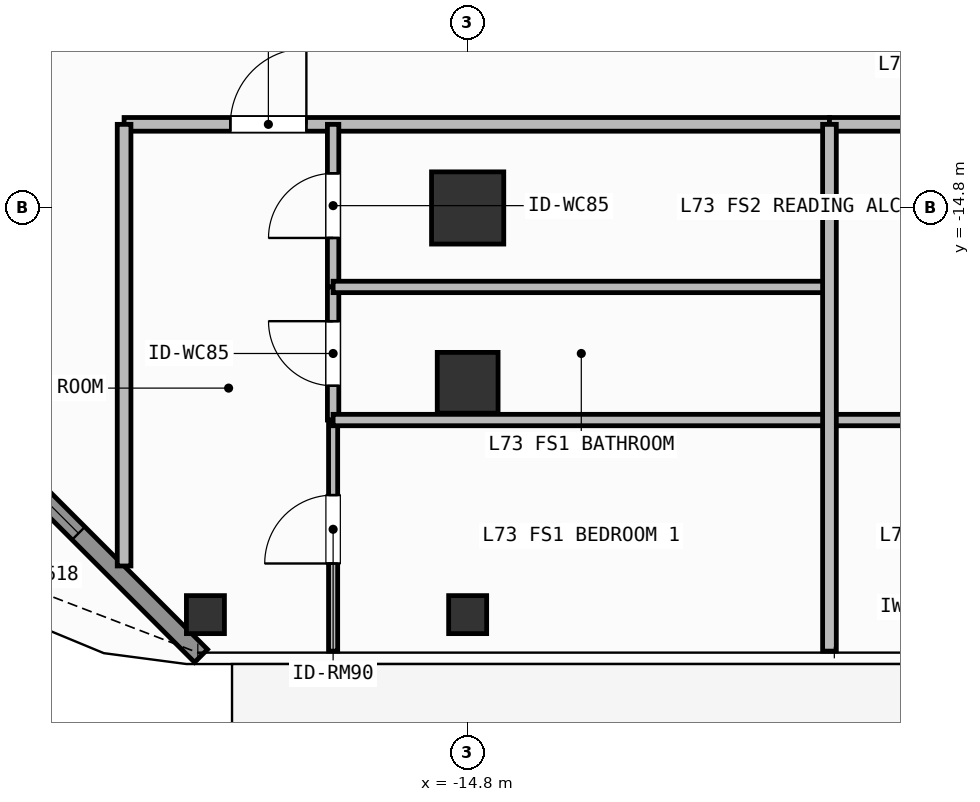
"""IFC4 building model, lengths in metres.
Left out: names, types, materials, properties, quantities, classifications, styles, units other than length and angle.
Written with IfcOpenShell. Run it as: python <this file> out.ifc"""

import sys

from ifc_helpers import new_model, si_unit, direction, frame, frame_2d, origin, origin_2d, place, context, subcontext, project, spatial, rectangle, hollow_rectangle, extrude, element, fill, save


model = new_model("IFC4")
c1 = context("Model", 3, precision=1e-05, world=origin(), true_north=direction((0.0, 1.0)))
c2 = subcontext(c1, "Body", "Model", "MODEL_VIEW")
j1 = project(units=[si_unit("LENGTHUNIT", "METRE"), si_unit("PLANEANGLEUNIT", "RADIAN")], contexts=[c1])
p1 = place(None, origin())
s1 = spatial("IfcSite", under=j1, at=p1, CompositionType="ELEMENT")
p2 = place(p1, origin())
s2 = spatial("IfcBuilding", under=s1, at=p2, CompositionType="ELEMENT")
p3 = place(p2, frame((0.0, 0.0, 297.6)))
s3 = spatial("IfcBuildingStorey", under=s2, at=p3, CompositionType="ELEMENT", Elevation=297.6)
p4 = place(p3, frame((-14.8, -14.8, 0.0), z_axis=(0.0, 0.0, 1.0), x_axis=(1.0, 0.0, 0.0)))
e1 = element("IfcColumn", 1, at=p4, inside=s3, PredefinedType="COLUMN", context=c2, shape_type="SweptSolid", body=[
    extrude(rectangle(XDim=0.95, YDim=0.95, at=origin_2d()), origin(), (0.0, 0.0, 1.0), 3.9),
])
p5 = place(p3, frame((-14.8, -17.1, 0.0), z_axis=(0.0, 0.0, 1.0), x_axis=(1.0, 0.0, 0.0)))
e2 = element("IfcColumn", 2, at=p5, inside=s3, PredefinedType="COLUMN", context=c2, shape_type="SweptSolid", body=[
    extrude(hollow_rectangle(XDim=0.8, YDim=0.8, WallThickness=0.036, at=origin_2d()), origin(), (0.0, 0.0, 1.0), 3.9),
])
for number, where, z_axis, x_axis in (
    (3, (-18.25, -20.15, 0.0), (0.0, 0.0, 1.0), (1.0, 0.0, 0.0)),
    (4, (-14.8, -20.15, 0.0), (0.0, 0.0, 1.0), (1.0, 0.0, 0.0)),
):
    element("IfcColumn", number, at=place(p3, frame(where, z_axis=z_axis, x_axis=x_axis)), inside=s3, PredefinedType="COLUMN", context=c2, shape_type="SweptSolid", body=[
        extrude(hollow_rectangle(XDim=0.5, YDim=0.5, WallThickness=0.025, at=origin_2d()), origin(), (0.0, 0.0, 1.0), 3.9),
    ])
p6 = place(p3, frame((-18.308, -20.692, 0.0), z_axis=(0.0, 0.0, 1.0), x_axis=(-0.707106781187, 0.707106781187, 0.0)))
e5 = element("IfcWall", 5, at=p6, inside=s3, PredefinedType="SOLIDWALL", context=c2, shape_type="SweptSolid", body=[
    extrude(rectangle(XDim=6.059, YDim=0.24, at=frame_2d((3.03, 0.0))), origin(), (0.0, 0.0, 1.0), 3.68),
])
p7 = place(p6, frame((2.28, 0.0, 0.8)))
e6 = element("IfcOpeningElement", 6, at=p7, cuts=e5, PredefinedType="OPENING", context=c2, shape_type="SweptSolid", body=[
    extrude(rectangle(XDim=1.5, YDim=1.85, at=frame_2d((0.75, 0.925))), frame((0.0, 0.13, 0.0), z_axis=(0.0, -1.0, 0.0), x_axis=(1.0, 0.0, 0.0)), (0.0, 0.0, 1.0), 0.26),
])
p8 = place(p3, frame((-19.32, -13.7, 0.0), z_axis=(0.0, 0.0, 1.0), x_axis=(1.0, 0.0, 0.0)))
e7 = element("IfcWall", 7, at=p8, inside=s3, PredefinedType="PARTITIONING", context=c2, shape_type="SweptSolid", body=[
    extrude(rectangle(XDim=9.28, YDim=0.18, at=frame_2d((4.64, 0.0))), origin(), (0.0, 0.0, 1.0), 3.68),
])
p9 = place(p8, frame((1.398, 0.0, 0.0)))
e8 = element("IfcOpeningElement", 8, at=p9, cuts=e7, PredefinedType="OPENING", context=c2, shape_type="SweptSolid", body=[
    extrude(rectangle(XDim=1.0, YDim=2.2, at=frame_2d((0.5, 1.1))), frame((0.0, 0.1, 0.0), z_axis=(0.0, -1.0, 0.0), x_axis=(1.0, 0.0, 0.0)), (0.0, 0.0, 1.0), 0.2),
])
p10 = place(p3, frame((-16.57, -15.839, 0.0), z_axis=(0.0, 0.0, 1.0), x_axis=(0.0, 1.0, 0.0)))
e9 = element("IfcWall", 9, at=p10, inside=s3, PredefinedType="PARTITIONING", context=c2, shape_type="SweptSolid", body=[
    extrude(rectangle(XDim=2.139, YDim=0.15, at=frame_2d((1.07, 0.0))), origin(), (0.0, 0.0, 1.0), 3.68),
])
p11 = place(p10, frame((0.645, 0.0, 0.0)))
e10 = element("IfcOpeningElement", 10, at=p11, cuts=e9, PredefinedType="OPENING", context=c2, shape_type="SweptSolid", body=[
    extrude(rectangle(XDim=0.85, YDim=2.1, at=frame_2d((0.425, 1.05))), frame((0.0, 0.085, 0.0), z_axis=(0.0, -1.0, 0.0), x_axis=(1.0, 0.0, 0.0)), (0.0, 0.0, 1.0), 0.17),
])
p12 = place(p3, frame((-16.57, -17.59, 0.0), z_axis=(0.0, 0.0, 1.0), x_axis=(0.0, 1.0, 0.0)))
e11 = element("IfcWall", 11, at=p12, inside=s3, PredefinedType="PARTITIONING", context=c2, shape_type="SweptSolid", body=[
    extrude(rectangle(XDim=1.751, YDim=0.15, at=frame_2d((0.875, 0.0))), origin(), (0.0, 0.0, 1.0), 3.68),
])
p13 = place(p12, frame((0.45, 0.0, 0.0)))
e12 = element("IfcOpeningElement", 12, at=p13, cuts=e11, PredefinedType="OPENING", context=c2, shape_type="SweptSolid", body=[
    extrude(rectangle(XDim=0.85, YDim=2.1, at=frame_2d((0.425, 1.05))), frame((0.0, 0.085, 0.0), z_axis=(0.0, -1.0, 0.0), x_axis=(1.0, 0.0, 0.0)), (0.0, 0.0, 1.0), 0.17),
])
p14 = place(p3, frame((-16.57, -20.63, 0.0), z_axis=(0.0, 0.0, 1.0), x_axis=(0.0, 1.0, 0.0)))
e13 = element("IfcWall", 13, at=p14, inside=s3, PredefinedType="PARTITIONING", context=c2, shape_type="SweptSolid", body=[
    extrude(rectangle(XDim=3.04, YDim=0.12, at=frame_2d((1.52, 0.0))), origin(), (0.0, 0.0, 1.0), 3.68),
])
p15 = place(p14, frame((1.153, 0.0, 0.0)))
e14 = element("IfcOpeningElement", 14, at=p15, cuts=e13, PredefinedType="OPENING", context=c2, shape_type="SweptSolid", body=[
    extrude(rectangle(XDim=0.9, YDim=2.1, at=frame_2d((0.45, 1.05))), frame((0.0, 0.07, 0.0), z_axis=(0.0, -1.0, 0.0), x_axis=(1.0, 0.0, 0.0)), (0.0, 0.0, 1.0), 0.14),
])
p16 = place(p3, frame((-10.04, -13.7, 0.0), z_axis=(0.0, 0.0, 1.0), x_axis=(1.0, 0.0, 0.0)))
e15 = element("IfcWall", 15, at=p16, inside=s3, PredefinedType="PARTITIONING", context=c2, shape_type="SweptSolid", body=[
    extrude(rectangle(XDim=15.323, YDim=0.18, at=frame_2d((7.662, 0.0))), origin(), (0.0, 0.0, 1.0), 3.68),
])
p17 = place(p16, frame((7.88, 0.0, 0.0)))
e16 = element("IfcOpeningElement", 16, at=p17, cuts=e15, PredefinedType="OPENING", context=c2, shape_type="SweptSolid", body=[
    extrude(rectangle(XDim=1.0, YDim=2.2, at=frame_2d((0.5, 1.1))), frame((0.0, 0.1, 0.0), z_axis=(0.0, -1.0, 0.0), x_axis=(1.0, 0.0, 0.0)), (0.0, 0.0, 1.0), 0.2),
])
p18 = place(p3, frame((-19.32, -19.51, 0.0), z_axis=(0.0, 0.0, 1.0), x_axis=(0.0, 1.0, 0.0)))
e17 = element("IfcWall", 17, at=p18, inside=s3, PredefinedType="PARTITIONING", context=c2, shape_type="SweptSolid", body=[
    extrude(rectangle(XDim=5.81, YDim=0.18, at=frame_2d((2.905, 0.0))), origin(), (0.0, 0.0, 1.0), 3.68),
])
for number, where, z_axis, x_axis in (
    (18, (-16.57, -15.839, 0.0), (0.0, 0.0, 1.0), (1.0, 0.0, 0.0)),
    (19, (-16.57, -17.59, 0.0), (0.0, 0.0, 1.0), (1.0, 0.0, 0.0)),
):
    element("IfcWall", number, at=place(p3, frame(where, z_axis=z_axis, x_axis=x_axis)), inside=s3, PredefinedType="PARTITIONING", context=c2, shape_type="SweptSolid", body=[
        extrude(rectangle(XDim=6.53, YDim=0.15, at=frame_2d((3.265, 0.0))), origin(), (0.0, 0.0, 1.0), 3.68),
    ])
p19 = place(p3, frame((-10.04, -17.59, 0.0), z_axis=(0.0, 0.0, 1.0), x_axis=(1.0, 0.0, 0.0)))
e20 = element("IfcWall", 20, at=p19, inside=s3, PredefinedType="PARTITIONING", context=c2, shape_type="SweptSolid", body=[
    extrude(rectangle(XDim=5.179, YDim=0.15, at=frame_2d((2.589, 0.0))), origin(), (0.0, 0.0, 1.0), 3.68),
])
p20 = place(p3, frame((-10.04, -20.63, 0.0), z_axis=(0.0, 0.0, 1.0), x_axis=(0.0, 1.0, 0.0)))
e21 = element("IfcWall", 21, at=p20, inside=s3, PredefinedType="PARTITIONING", context=c2, shape_type="SweptSolid", body=[
    extrude(rectangle(XDim=6.93, YDim=0.18, at=frame_2d((3.465, 0.0))), origin(), (0.0, 0.0, 1.0), 3.68),
])
p21 = place(p7, origin())
e22 = element("IfcWindow", 22, at=p21, inside=s3, PartitioningType="SINGLE_PANEL", PredefinedType="WINDOW", context=c2, shape_type="SweptSolid", body=[
    extrude(rectangle(XDim=1.5, YDim=1.85, at=frame_2d((0.75, 0.925))), frame((0.0, 0.03, 0.0), z_axis=(0.0, -1.0, 0.0), x_axis=(1.0, 0.0, 0.0)), (0.0, 0.0, 1.0), 0.06),
])
fill(e6, e22)
p22 = place(p9, origin())
e23 = element("IfcDoor", 23, at=p22, inside=s3, OperationType="SINGLE_SWING_RIGHT", PredefinedType="DOOR", context=c2, shape_type="SweptSolid", body=[
    extrude(rectangle(XDim=1.0, YDim=2.2, at=frame_2d((0.5, 1.1))), frame((0.0, 0.025, 0.0), z_axis=(0.0, -1.0, 0.0), x_axis=(1.0, 0.0, 0.0)), (0.0, 0.0, 1.0), 0.05),
])
fill(e8, e23)
p23 = place(p11, origin())
e24 = element("IfcDoor", 24, at=p23, inside=s3, OperationType="SINGLE_SWING_LEFT", PredefinedType="DOOR", context=c2, shape_type="SweptSolid", body=[
    extrude(rectangle(XDim=0.85, YDim=2.1, at=frame_2d((0.425, 1.05))), frame((0.0, 0.025, 0.0), z_axis=(0.0, -1.0, 0.0), x_axis=(1.0, 0.0, 0.0)), (0.0, 0.0, 1.0), 0.05),
])
fill(e10, e24)
p24 = place(p13, origin())
e25 = element("IfcDoor", 25, at=p24, inside=s3, OperationType="SINGLE_SWING_RIGHT", PredefinedType="DOOR", context=c2, shape_type="SweptSolid", body=[
    extrude(rectangle(XDim=0.85, YDim=2.1, at=frame_2d((0.425, 1.05))), frame((0.0, 0.025, 0.0), z_axis=(0.0, -1.0, 0.0), x_axis=(1.0, 0.0, 0.0)), (0.0, 0.0, 1.0), 0.05),
])
fill(e12, e25)
p25 = place(p15, origin())
e26 = element("IfcDoor", 26, at=p25, inside=s3, OperationType="SINGLE_SWING_LEFT", PredefinedType="DOOR", context=c2, shape_type="SweptSolid", body=[
    extrude(rectangle(XDim=0.9, YDim=2.1, at=frame_2d((0.45, 1.05))), frame((0.0, 0.025, 0.0), z_axis=(0.0, -1.0, 0.0), x_axis=(1.0, 0.0, 0.0)), (0.0, 0.0, 1.0), 0.05),
])
fill(e14, e26)
save(model, sys.argv[1])
